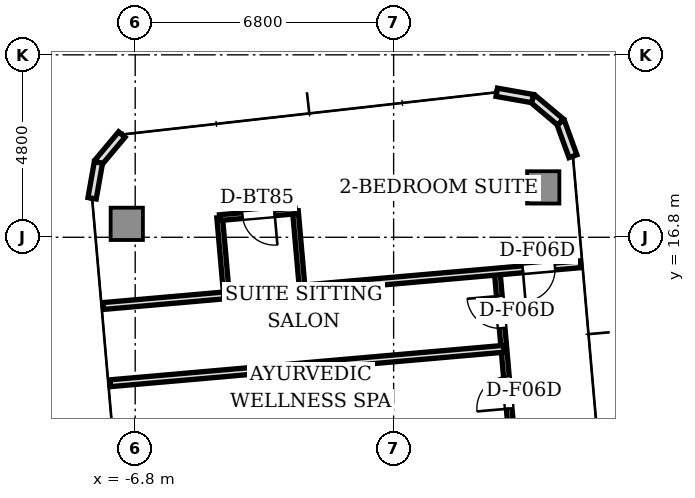
"""IFC4 building model, lengths in metres.
Left out: names, types, materials, properties, quantities, classifications, styles, units other than length and angle.
Written with IfcOpenShell. Run it as: python <this file> out.ifc"""

import sys

from ifc_helpers import new_model, si_unit, direction, frame, frame_2d, origin, origin_2d, place, context, subcontext, project, spatial, rectangle, extrude, source, transform, mapped, element, fill, save


model = new_model("IFC4")
c1 = context("Model", 3, precision=1e-05, world=origin(), true_north=direction((0.0, 1.0)))
c2 = subcontext(c1, "Body", "Model", "MODEL_VIEW")
j1 = project(units=[si_unit("LENGTHUNIT", "METRE"), si_unit("PLANEANGLEUNIT", "RADIAN")], contexts=[c1])
p1 = place(None, origin())
s1 = spatial("IfcSite", under=j1, at=p1, CompositionType="ELEMENT")
p2 = place(p1, origin())
s2 = spatial("IfcBuilding", under=s1, at=p2, CompositionType="ELEMENT")
p3 = place(p2, frame((0.0, 0.0, 188.6)))
s3 = spatial("IfcBuildingStorey", under=s2, at=p3, CompositionType="ELEMENT", Elevation=188.6)
m1 = source(origin(), c2, "Body", "SweptSolid", [
    extrude(rectangle(XDim=0.85, YDim=0.85, at=origin_2d()), origin(), (0.0, 0.0, 1.0), 3.11),
])
for number, where, z_axis, x_axis in (
    (1, (3.936, 18.112, 0.0), (0.0, 0.0, 1.0), (1.0, 0.0, 0.0)),
    (2, (-7.022, 17.153, 0.0), (0.0, 0.0, 1.0), (1.0, 0.0, 0.0)),
):
    element("IfcColumn", number, at=place(p3, frame(where, z_axis=z_axis, x_axis=x_axis)), inside=s3, PredefinedType="COLUMN", context=c2, shape_type="MappedRepresentation", body=[
        mapped(m1, transform((0.0, 0.0, 0.0), scale=1.0)),
    ])
p4 = place(p3, frame((4.718, 18.933, 0.0), z_axis=(0.0, 0.0, 1.0), x_axis=(-0.34188635151, 0.939741306239, 0.0)))
e3 = element("IfcWall", 3, at=p4, inside=s3, PredefinedType="STANDARD", context=c2, shape_type="SweptSolid", body=[
    extrude(rectangle(XDim=0.958, YDim=0.22, at=frame_2d((0.479, 0.0))), origin(), (0.0, 0.0, 1.0), 3.11),
])
for number, where, z_axis, x_axis in (
    (4, (4.39, 19.833, 0.0), (0.0, 0.0, 1.0), (-0.766, 0.643, 0.0)),
    (5, (3.657, 20.449, 0.0), (0.0, 0.0, 1.0), (-0.985, 0.174, 0.0)),
):
    element("IfcWall", number, at=place(p3, frame(where, z_axis=z_axis, x_axis=x_axis)), inside=s3, PredefinedType="STANDARD", context=c2, shape_type="SweptSolid", body=[
        extrude(rectangle(XDim=0.958, YDim=0.22, at=frame_2d((0.479, 0.0))), origin(), (0.0, 0.0, 1.0), 3.11),
    ])
for number, where, z_axis, x_axis in (
    (6, (-7.152, 19.503, 0.0), (0.0, 0.0, 1.0), (-0.643, -0.766, 0.0)),
    (7, (-7.768, 18.769, 0.0), (0.0, 0.0, 1.0), (-0.174, -0.985, 0.0)),
):
    element("IfcWall", number, at=place(p3, frame(where, z_axis=z_axis, x_axis=x_axis)), inside=s3, PredefinedType="STANDARD", context=c2, shape_type="SweptSolid", body=[
        extrude(rectangle(XDim=0.958, YDim=0.22, at=frame_2d((0.479, 0.0))), origin(), (0.0, 0.0, 1.0), 3.11),
    ])
p5 = place(p3, frame((3.095, 11.664, 0.0), z_axis=(0.0, 0.0, 1.0), x_axis=(-0.087142722004, 0.996195837173, 0.0)))
e8 = element("IfcWall", 8, at=p5, inside=s3, PredefinedType="PARTITIONING", context=c2, shape_type="SweptSolid", body=[
    extrude(rectangle(XDim=4.25, YDim=0.15, at=frame_2d((2.125, 0.0))), origin(), (0.0, 0.0, 1.0), 2.66),
])
p6 = place(p5, frame((0.63, 0.0, 0.0)))
e9 = element("IfcOpeningElement", 9, at=p6, cuts=e8, PredefinedType="OPENING", context=c2, shape_type="SweptSolid", body=[
    extrude(rectangle(XDim=0.85, YDim=2.1, at=frame_2d((0.425, 1.05))), frame((0.0, 0.085, 0.0), z_axis=(0.0, -1.0, 0.0), x_axis=(1.0, 0.0, 0.0)), (0.0, 0.0, 1.0), 0.17),
])
p7 = place(p5, frame((2.755, 0.0, 0.0)))
e10 = element("IfcOpeningElement", 10, at=p7, cuts=e8, PredefinedType="OPENING", context=c2, shape_type="SweptSolid", body=[
    extrude(rectangle(XDim=0.85, YDim=2.1, at=frame_2d((0.425, 1.05))), frame((0.0, 0.085, 0.0), z_axis=(0.0, -1.0, 0.0), x_axis=(1.0, 0.0, 0.0)), (0.0, 0.0, 1.0), 0.17),
])
p8 = place(p3, frame((2.903, 13.866, 0.0), z_axis=(0.0, 0.0, 1.0), x_axis=(-0.996194201607, -0.087161417409, 0.0)))
e11 = element("IfcWall", 11, at=p8, inside=s3, PredefinedType="PARTITIONING", context=c2, shape_type="SweptSolid", body=[
    extrude(rectangle(XDim=10.4, YDim=0.18, at=frame_2d((5.2, 0.0))), origin(), (0.0, 0.0, 1.0), 2.66),
])
p9 = place(p3, frame((4.917, 16.09, 0.0), z_axis=(0.0, 0.0, 1.0), x_axis=(-0.996196619285, -0.087133780622, 0.0)))
e12 = element("IfcWall", 12, at=p9, inside=s3, PredefinedType="PARTITIONING", context=c2, shape_type="SweptSolid", body=[
    extrude(rectangle(XDim=12.6, YDim=0.18, at=frame_2d((6.3, 0.0))), origin(), (0.0, 0.0, 1.0), 2.66),
])
p10 = place(p9, frame((0.675, 0.0, 0.0)))
e13 = element("IfcOpeningElement", 13, at=p10, cuts=e12, PredefinedType="OPENING", context=c2, shape_type="SweptSolid", body=[
    extrude(rectangle(XDim=0.85, YDim=2.1, at=frame_2d((0.425, 1.05))), frame((0.0, 0.1, 0.0), z_axis=(0.0, -1.0, 0.0), x_axis=(1.0, 0.0, 0.0)), (0.0, 0.0, 1.0), 0.2),
])
for number, where, z_axis, x_axis in (
    (14, (-4.398, 15.275, 0.0), (0.0, 0.0, 1.0), (-0.087, 0.996, 0.0)),
    (15, (-2.406, 15.449, 0.0), (0.0, 0.0, 1.0), (-0.087, 0.996, 0.0)),
):
    element("IfcWall", number, at=place(p3, frame(where, z_axis=z_axis, x_axis=x_axis)), inside=s3, PredefinedType="PARTITIONING", context=c2, shape_type="SweptSolid", body=[
        extrude(rectangle(XDim=2.05, YDim=0.15, at=frame_2d((1.025, 0.0))), origin(), (0.0, 0.0, 1.0), 2.66),
    ])
p11 = place(p3, frame((-2.584, 17.491, 0.0), z_axis=(0.0, 0.0, 1.0), x_axis=(-0.99619464492, -0.087156350505, 0.0)))
e16 = element("IfcWall", 16, at=p11, inside=s3, PredefinedType="PARTITIONING", context=c2, shape_type="SweptSolid", body=[
    extrude(rectangle(XDim=2.0, YDim=0.15, at=frame_2d((1.0, 0.0))), origin(), (0.0, 0.0, 1.0), 2.63),
])
p12 = place(p11, frame((0.55, 0.0, 0.0)))
e17 = element("IfcOpeningElement", 17, at=p12, cuts=e16, PredefinedType="OPENING", context=c2, shape_type="SweptSolid", body=[
    extrude(rectangle(XDim=0.85, YDim=2.1, at=frame_2d((0.425, 1.05))), frame((0.0, 0.085, 0.0), z_axis=(0.0, -1.0, 0.0), x_axis=(1.0, 0.0, 0.0)), (0.0, 0.0, 1.0), 0.17),
])
m2 = source(origin(), c2, "Body", "SweptSolid", [
    extrude(rectangle(XDim=0.85, YDim=0.05, at=origin_2d()), origin(), (0.0, 0.0, 1.0), 2.1),
])
p13 = place(p6, frame((0.425, 0.0, 0.0)))
e18 = element("IfcDoor", 18, at=p13, inside=s3, OperationType="SINGLE_SWING_LEFT", PredefinedType="DOOR", context=c2, shape_type="MappedRepresentation", body=[
    mapped(m2, transform((0.0, 0.0, 0.0), scale=1.0)),
])
fill(e9, e18)
p14 = place(p7, frame((0.425, 0.0, 0.0)))
e19 = element("IfcDoor", 19, at=p14, inside=s3, OperationType="SINGLE_SWING_RIGHT", PredefinedType="DOOR", context=c2, shape_type="MappedRepresentation", body=[
    mapped(m2, transform((0.0, 0.0, 0.0), scale=1.0)),
])
fill(e10, e19)
p15 = place(p12, frame((0.425, 0.0, 0.0)))
e20 = element("IfcDoor", 20, at=p15, inside=s3, OperationType="SINGLE_SWING_LEFT", PredefinedType="DOOR", context=c2, shape_type="MappedRepresentation", body=[
    mapped(m2, transform((0.0, 0.0, 0.0), scale=1.0)),
])
fill(e17, e20)
p16 = place(p10, frame((0.425, 0.0, 0.0)))
e21 = element("IfcDoor", 21, at=p16, inside=s3, OperationType="SINGLE_SWING_RIGHT", PredefinedType="DOOR", context=c2, shape_type="MappedRepresentation", body=[
    mapped(m2, transform((0.0, 0.0, 0.0), scale=1.0)),
])
fill(e13, e21)
save(model, sys.argv[1])
